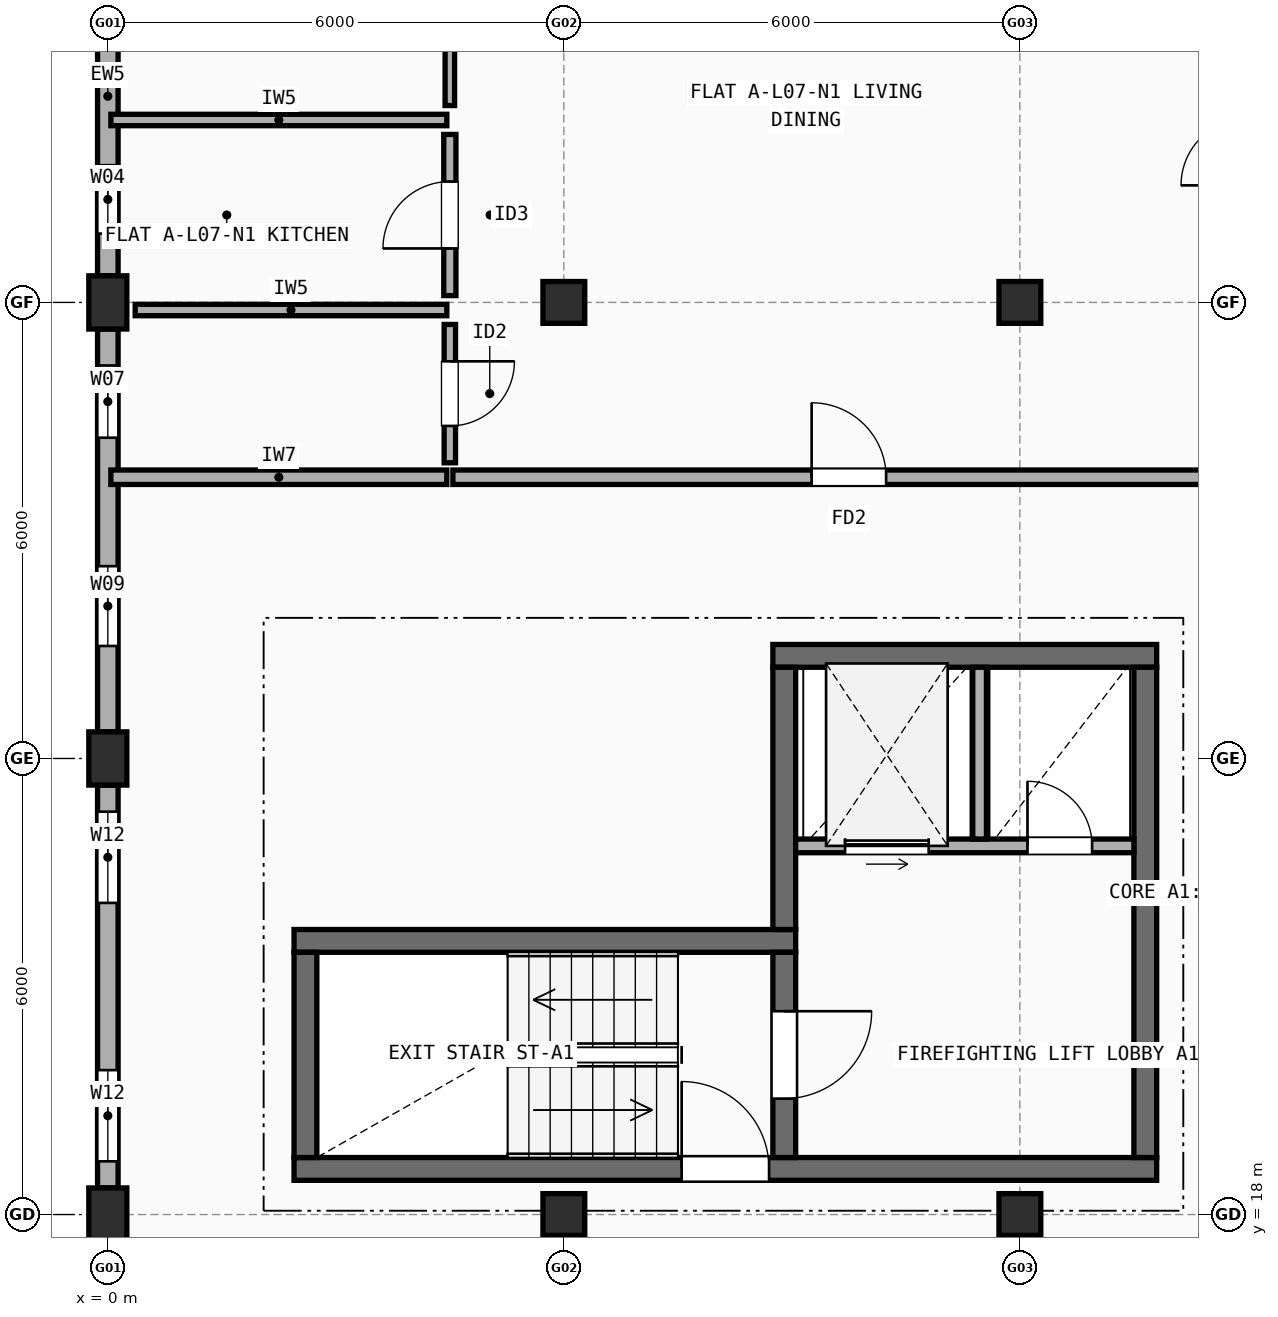
"""IFC4 building model, lengths in metres.
Left out: names, types, materials, properties, quantities, classifications, styles, units other than length and angle.
Written with IfcOpenShell. Run it as: python <this file> out.ifc"""

import sys

from ifc_helpers import new_model, si_unit, direction, frame, frame_2d, origin, origin_2d, place, context, subcontext, project, spatial, rectangle, extrude, element, fill, save


model = new_model("IFC4")
c1 = context("Model", 3, precision=1e-05, world=origin(), true_north=direction((0.0, 1.0)))
c2 = subcontext(c1, "Body", "Model", "MODEL_VIEW")
j1 = project(units=[si_unit("LENGTHUNIT", "METRE"), si_unit("PLANEANGLEUNIT", "RADIAN")], contexts=[c1])
p1 = place(None, origin())
s1 = spatial("IfcSite", under=j1, at=p1, CompositionType="ELEMENT")
p2 = place(p1, origin())
s2 = spatial("IfcBuilding", under=s1, at=p2, CompositionType="ELEMENT")
p3 = place(p2, frame((0.0, 0.0, 23.7)))
s3 = spatial("IfcBuildingStorey", under=s2, at=p3, CompositionType="ELEMENT", Elevation=23.7)
for number, where, z_axis, x_axis in (
    (1, (0.0, 18.0, 0.0), (0.0, 0.0, 1.0), (1.0, 0.0, 0.0)),
    (2, (0.0, 24.0, 0.0), (0.0, 0.0, 1.0), (1.0, 0.0, 0.0)),
    (3, (0.0, 30.0, 0.0), (0.0, 0.0, 1.0), (1.0, 0.0, 0.0)),
):
    element("IfcColumn", number, at=place(p3, frame(where, z_axis=z_axis, x_axis=x_axis)), inside=s3, PredefinedType="COLUMN", context=c2, shape_type="SweptSolid", body=[
        extrude(rectangle(XDim=0.5, YDim=0.7, at=origin_2d()), origin(), (0.0, 0.0, 1.0), 2.975),
    ])
for number, where, z_axis, x_axis in (
    (4, (6.0, 18.0, 0.0), (0.0, 0.0, 1.0), (1.0, 0.0, 0.0)),
    (5, (6.0, 30.0, 0.0), (0.0, 0.0, 1.0), (1.0, 0.0, 0.0)),
    (6, (12.0, 18.0, 0.0), (0.0, 0.0, 1.0), (1.0, 0.0, 0.0)),
    (7, (12.0, 30.0, 0.0), (0.0, 0.0, 1.0), (1.0, 0.0, 0.0)),
):
    element("IfcColumn", number, at=place(p3, frame(where, z_axis=z_axis, x_axis=x_axis)), inside=s3, PredefinedType="COLUMN", context=c2, shape_type="SweptSolid", body=[
        extrude(rectangle(XDim=0.55, YDim=0.55, at=origin_2d()), origin(), (0.0, 0.0, 1.0), 2.975),
    ])
p4 = place(p3, frame((0.0, 35.65, 0.0), z_axis=(0.0, 0.0, 1.0), x_axis=(0.0, -1.0, 0.0)))
e8 = element("IfcWall", 8, at=p4, inside=s3, PredefinedType="STANDARD", context=c2, shape_type="SweptSolid", body=[
    extrude(rectangle(XDim=5.3, YDim=0.27, at=frame_2d((2.65, 0.0))), origin(), (0.0, 0.0, 1.0), 2.457),
])
p5 = place(p4, frame((1.18, 0.0, 0.9)))
e9 = element("IfcOpeningElement", 9, at=p5, cuts=e8, PredefinedType="OPENING", context=c2, shape_type="SweptSolid", body=[
    extrude(rectangle(XDim=0.85, YDim=1.25, at=frame_2d((0.425, 0.625))), frame((0.0, 0.145, 0.0), z_axis=(0.0, -1.0, 0.0), x_axis=(1.0, 0.0, 0.0)), (0.0, 0.0, 1.0), 0.29),
])
p6 = place(p4, frame((3.845, 0.0, 0.9)))
e10 = element("IfcOpeningElement", 10, at=p6, cuts=e8, PredefinedType="OPENING", context=c2, shape_type="SweptSolid", body=[
    extrude(rectangle(XDim=0.9, YDim=1.3, at=frame_2d((0.45, 0.65))), frame((0.0, 0.145, 0.0), z_axis=(0.0, -1.0, 0.0), x_axis=(1.0, 0.0, 0.0)), (0.0, 0.0, 1.0), 0.29),
])
p7 = place(p3, frame((0.0, 29.65, 0.0), z_axis=(0.0, 0.0, 1.0), x_axis=(0.0, -1.0, 0.0)))
e11 = element("IfcWall", 11, at=p7, inside=s3, PredefinedType="STANDARD", context=c2, shape_type="SweptSolid", body=[
    extrude(rectangle(XDim=5.3, YDim=0.27, at=frame_2d((2.65, 0.0))), origin(), (0.0, 0.0, 1.0), 2.457),
])
p8 = place(p7, frame((0.48, 0.0, 0.9)))
e12 = element("IfcOpeningElement", 12, at=p8, cuts=e11, PredefinedType="OPENING", context=c2, shape_type="SweptSolid", body=[
    extrude(rectangle(XDim=0.95, YDim=1.35, at=frame_2d((0.475, 0.675))), frame((0.0, 0.145, 0.0), z_axis=(0.0, -1.0, 0.0), x_axis=(1.0, 0.0, 0.0)), (0.0, 0.0, 1.0), 0.29),
])
p9 = place(p7, frame((3.12, 0.0, 0.9)))
e13 = element("IfcOpeningElement", 13, at=p9, cuts=e11, PredefinedType="OPENING", context=c2, shape_type="SweptSolid", body=[
    extrude(rectangle(XDim=1.05, YDim=1.35, at=frame_2d((0.525, 0.675))), frame((0.0, 0.145, 0.0), z_axis=(0.0, -1.0, 0.0), x_axis=(1.0, 0.0, 0.0)), (0.0, 0.0, 1.0), 0.29),
])
p10 = place(p3, frame((0.0, 23.65, 0.0), z_axis=(0.0, 0.0, 1.0), x_axis=(0.0, -1.0, 0.0)))
e14 = element("IfcWall", 14, at=p10, inside=s3, PredefinedType="STANDARD", context=c2, shape_type="SweptSolid", body=[
    extrude(rectangle(XDim=5.3, YDim=0.27, at=frame_2d((2.65, 0.0))), origin(), (0.0, 0.0, 1.0), 2.457),
])
p11 = place(p10, frame((0.35, 0.0, 0.9)))
e15 = element("IfcOpeningElement", 15, at=p11, cuts=e14, PredefinedType="OPENING", context=c2, shape_type="SweptSolid", body=[
    extrude(rectangle(XDim=1.2, YDim=1.35, at=frame_2d((0.6, 0.675))), frame((0.0, 0.145, 0.0), z_axis=(0.0, -1.0, 0.0), x_axis=(1.0, 0.0, 0.0)), (0.0, 0.0, 1.0), 0.29),
])
p12 = place(p10, frame((3.75, 0.0, 0.9)))
e16 = element("IfcOpeningElement", 16, at=p12, cuts=e14, PredefinedType="OPENING", context=c2, shape_type="SweptSolid", body=[
    extrude(rectangle(XDim=1.2, YDim=1.35, at=frame_2d((0.6, 0.675))), frame((0.0, 0.145, 0.0), z_axis=(0.0, -1.0, 0.0), x_axis=(1.0, 0.0, 0.0)), (0.0, 0.0, 1.0), 0.29),
])
p13 = place(p3, frame((2.45, 18.6, 0.0), z_axis=(0.0, 0.0, 1.0), x_axis=(1.0, 0.0, 0.0)))
e17 = element("IfcWall", 17, at=p13, inside=s3, PredefinedType="SHEAR", context=c2, shape_type="SweptSolid", body=[
    extrude(rectangle(XDim=11.35, YDim=0.3, at=frame_2d((5.675, 0.0))), origin(), (0.0, 0.0, 1.0), 2.975),
])
p14 = place(p13, frame((5.1, 0.0, 0.0)))
e18 = element("IfcOpeningElement", 18, at=p14, cuts=e17, PredefinedType="OPENING", context=c2, shape_type="SweptSolid", body=[
    extrude(rectangle(XDim=1.15, YDim=2.15, at=frame_2d((0.575, 1.075))), frame((0.0, 0.16, 0.0), z_axis=(0.0, -1.0, 0.0), x_axis=(1.0, 0.0, 0.0)), (0.0, 0.0, 1.0), 0.32),
])
p15 = place(p3, frame((9.05, 21.6, 0.0), z_axis=(0.0, 0.0, 1.0), x_axis=(-1.0, 0.0, 0.0)))
e19 = element("IfcWall", 19, at=p15, inside=s3, PredefinedType="SHEAR", context=c2, shape_type="SweptSolid", body=[
    extrude(rectangle(XDim=6.6, YDim=0.3, at=frame_2d((3.3, 0.0))), origin(), (0.0, 0.0, 1.0), 2.975),
])
p16 = place(p3, frame((2.6, 21.45, 0.0), z_axis=(0.0, 0.0, 1.0), x_axis=(0.0, -1.0, 0.0)))
e20 = element("IfcWall", 20, at=p16, inside=s3, PredefinedType="SHEAR", context=c2, shape_type="SweptSolid", body=[
    extrude(rectangle(XDim=2.7, YDim=0.3, at=frame_2d((1.35, 0.0))), origin(), (0.0, 0.0, 1.0), 2.975),
])
p17 = place(p3, frame((8.9, 18.75, 0.0), z_axis=(0.0, 0.0, 1.0), x_axis=(0.0, 1.0, 0.0)))
e21 = element("IfcWall", 21, at=p17, inside=s3, PredefinedType="SHEAR", context=c2, shape_type="SweptSolid", body=[
    extrude(rectangle(XDim=2.7, YDim=0.3, at=frame_2d((1.35, 0.0))), origin(), (0.0, 0.0, 1.0), 2.975),
])
p18 = place(p17, frame((0.775, 0.0, 0.0)))
e22 = element("IfcOpeningElement", 22, at=p18, cuts=e21, PredefinedType="OPENING", context=c2, shape_type="SweptSolid", body=[
    extrude(rectangle(XDim=1.15, YDim=2.15, at=frame_2d((0.575, 1.075))), frame((0.0, 0.16, 0.0), z_axis=(0.0, -1.0, 0.0), x_axis=(1.0, 0.0, 0.0)), (0.0, 0.0, 1.0), 0.32),
])
p19 = place(p3, frame((13.8, 25.35, 0.0), z_axis=(0.0, 0.0, 1.0), x_axis=(-1.0, 0.0, 0.0)))
e23 = element("IfcWall", 23, at=p19, inside=s3, PredefinedType="SHEAR", context=c2, shape_type="SweptSolid", body=[
    extrude(rectangle(XDim=5.05, YDim=0.3, at=frame_2d((2.525, 0.0))), origin(), (0.0, 0.0, 1.0), 2.975),
])
p20 = place(p3, frame((13.65, 18.75, 0.0), z_axis=(0.0, 0.0, 1.0), x_axis=(0.0, 1.0, 0.0)))
e24 = element("IfcWall", 24, at=p20, inside=s3, PredefinedType="SHEAR", context=c2, shape_type="SweptSolid", body=[
    extrude(rectangle(XDim=6.45, YDim=0.3, at=frame_2d((3.225, 0.0))), origin(), (0.0, 0.0, 1.0), 2.975),
])
p21 = place(p3, frame((8.9, 21.75, 0.0), z_axis=(0.0, 0.0, 1.0), x_axis=(0.0, 1.0, 0.0)))
e25 = element("IfcWall", 25, at=p21, inside=s3, PredefinedType="SHEAR", context=c2, shape_type="SweptSolid", body=[
    extrude(rectangle(XDim=3.45, YDim=0.3, at=frame_2d((1.725, 0.0))), origin(), (0.0, 0.0, 1.0), 2.975),
])
p22 = place(p3, frame((9.05, 22.85, 0.0), z_axis=(0.0, 0.0, 1.0), x_axis=(1.0, 0.0, 0.0)))
e26 = element("IfcWall", 26, at=p22, inside=s3, PredefinedType="SOLIDWALL", context=c2, shape_type="SweptSolid", body=[
    extrude(rectangle(XDim=4.45, YDim=0.18, at=frame_2d((2.225, 0.0))), origin(), (0.0, 0.0, 1.0), 2.975),
])
p23 = place(p22, frame((0.65, 0.0, 0.0)))
e27 = element("IfcOpeningElement", 27, at=p23, cuts=e26, PredefinedType="OPENING", context=c2, shape_type="SweptSolid", body=[
    extrude(rectangle(XDim=1.1, YDim=2.15, at=frame_2d((0.55, 1.075))), frame((0.0, 0.1, 0.0), z_axis=(0.0, -1.0, 0.0), x_axis=(1.0, 0.0, 0.0)), (0.0, 0.0, 1.0), 0.2),
])
p24 = place(p22, frame((3.05, 0.0, 0.0)))
e28 = element("IfcOpeningElement", 28, at=p24, cuts=e26, PredefinedType="OPENING", context=c2, shape_type="SweptSolid", body=[
    extrude(rectangle(XDim=0.85, YDim=2.1, at=frame_2d((0.425, 1.05))), frame((0.0, 0.1, 0.0), z_axis=(0.0, -1.0, 0.0), x_axis=(1.0, 0.0, 0.0)), (0.0, 0.0, 1.0), 0.2),
])
p25 = place(p3, frame((11.47, 22.94, 0.0), z_axis=(0.0, 0.0, 1.0), x_axis=(0.0, 1.0, 0.0)))
e29 = element("IfcWall", 29, at=p25, inside=s3, PredefinedType="SOLIDWALL", context=c2, shape_type="SweptSolid", body=[
    extrude(rectangle(XDim=2.26, YDim=0.18, at=frame_2d((1.13, 0.0))), origin(), (0.0, 0.0, 1.0), 2.975),
])
p26 = place(p3, frame((0.04, 27.7, 0.0), z_axis=(0.0, 0.0, 1.0), x_axis=(1.0, 0.0, 0.0)))
e30 = element("IfcWall", 30, at=p26, inside=s3, PredefinedType="SOLIDWALL", context=c2, shape_type="SweptSolid", body=[
    extrude(rectangle(XDim=4.42, YDim=0.19, at=frame_2d((2.21, 0.0))), origin(), (0.0, 0.0, 1.0), 2.457),
])
p27 = place(p3, frame((4.54, 27.7, 0.0), z_axis=(0.0, 0.0, 1.0), x_axis=(1.0, 0.0, 0.0)))
e31 = element("IfcWall", 31, at=p27, inside=s3, PredefinedType="SOLIDWALL", context=c2, shape_type="SweptSolid", body=[
    extrude(rectangle(XDim=10.42, YDim=0.19, at=frame_2d((5.21, 0.0))), origin(), (0.0, 0.0, 1.0), 2.508),
])
p28 = place(p27, frame((4.72, 0.0, 0.0)))
e32 = element("IfcOpeningElement", 32, at=p28, cuts=e31, PredefinedType="OPENING", context=c2, shape_type="SweptSolid", body=[
    extrude(rectangle(XDim=0.98, YDim=2.15, at=frame_2d((0.49, 1.075))), frame((0.0, 0.105, 0.0), z_axis=(0.0, -1.0, 0.0), x_axis=(1.0, 0.0, 0.0)), (0.0, 0.0, 1.0), 0.21),
])
p29 = place(p3, frame((4.5, 32.59, 0.0), z_axis=(0.0, 0.0, 1.0), x_axis=(0.0, 1.0, 0.0)))
e33 = element("IfcWall", 33, at=p29, inside=s3, PredefinedType="PARTITIONING", context=c2, shape_type="SweptSolid", body=[
    extrude(rectangle(XDim=3.22, YDim=0.125, at=frame_2d((1.61, 0.0))), origin(), (0.0, 0.0, 1.0), 2.975),
])
p30 = place(p29, frame((1.16, 0.0, 0.0)))
e34 = element("IfcOpeningElement", 34, at=p30, cuts=e33, PredefinedType="OPENING", context=c2, shape_type="SweptSolid", body=[
    extrude(rectangle(XDim=0.9, YDim=2.1, at=frame_2d((0.45, 1.05))), frame((0.0, 0.073, 0.0), z_axis=(0.0, -1.0, 0.0), x_axis=(1.0, 0.0, 0.0)), (0.0, 0.0, 1.0), 0.145),
])
p31 = place(p3, frame((4.5, 30.09, 0.0), z_axis=(0.0, 0.0, 1.0), x_axis=(0.0, 1.0, 0.0)))
e35 = element("IfcWall", 35, at=p31, inside=s3, PredefinedType="PLUMBINGWALL", context=c2, shape_type="SweptSolid", body=[
    extrude(rectangle(XDim=2.12, YDim=0.16, at=frame_2d((1.06, 0.0))), origin(), (0.0, 0.0, 1.0), 2.457),
])
p32 = place(p31, frame((0.62, 0.0, 0.0)))
e36 = element("IfcOpeningElement", 36, at=p32, cuts=e35, PredefinedType="OPENING", context=c2, shape_type="SweptSolid", body=[
    extrude(rectangle(XDim=0.88, YDim=2.1, at=frame_2d((0.44, 1.05))), frame((0.0, 0.09, 0.0), z_axis=(0.0, -1.0, 0.0), x_axis=(1.0, 0.0, 0.0)), (0.0, 0.0, 1.0), 0.18),
])
p33 = place(p3, frame((4.5, 27.89, 0.0), z_axis=(0.0, 0.0, 1.0), x_axis=(0.0, 1.0, 0.0)))
e37 = element("IfcWall", 37, at=p33, inside=s3, PredefinedType="PARTITIONING", context=c2, shape_type="SweptSolid", body=[
    extrude(rectangle(XDim=1.82, YDim=0.15, at=frame_2d((0.91, 0.0))), origin(), (0.0, 0.0, 1.0), 2.975),
])
p34 = place(p33, frame((0.485, 0.0, 0.0)))
e38 = element("IfcOpeningElement", 38, at=p34, cuts=e37, PredefinedType="OPENING", context=c2, shape_type="SweptSolid", body=[
    extrude(rectangle(XDim=0.85, YDim=2.1, at=frame_2d((0.425, 1.05))), frame((0.0, 0.085, 0.0), z_axis=(0.0, -1.0, 0.0), x_axis=(1.0, 0.0, 0.0)), (0.0, 0.0, 1.0), 0.17),
])
p35 = place(p3, frame((0.04, 32.4, 0.0), z_axis=(0.0, 0.0, 1.0), x_axis=(1.0, 0.0, 0.0)))
e39 = element("IfcWall", 39, at=p35, inside=s3, PredefinedType="PARTITIONING", context=c2, shape_type="SweptSolid", body=[
    extrude(rectangle(XDim=4.42, YDim=0.15, at=frame_2d((2.21, 0.0))), origin(), (0.0, 0.0, 1.0), 2.457),
])
p36 = place(p3, frame((0.36, 29.9, 0.0), z_axis=(0.0, 0.0, 1.0), x_axis=(1.0, 0.0, 0.0)))
e40 = element("IfcWall", 40, at=p36, inside=s3, PredefinedType="PARTITIONING", context=c2, shape_type="SweptSolid", body=[
    extrude(rectangle(XDim=4.1, YDim=0.15, at=frame_2d((2.05, 0.0))), origin(), (0.0, 0.0, 1.0), 2.457),
])
p37 = place(p6, origin())
e41 = element("IfcWindow", 41, at=p37, inside=s3, PartitioningType="SINGLE_PANEL", PredefinedType="WINDOW", context=c2, shape_type="SweptSolid", body=[
    extrude(rectangle(XDim=0.9, YDim=1.3, at=frame_2d((0.45, 0.65))), frame((0.0, 0.03, 0.0), z_axis=(0.0, -1.0, 0.0), x_axis=(1.0, 0.0, 0.0)), (0.0, 0.0, 1.0), 0.06),
])
fill(e10, e41)
p38 = place(p8, origin())
e42 = element("IfcWindow", 42, at=p38, inside=s3, PartitioningType="SINGLE_PANEL", PredefinedType="WINDOW", context=c2, shape_type="SweptSolid", body=[
    extrude(rectangle(XDim=0.95, YDim=1.35, at=frame_2d((0.475, 0.675))), frame((0.0, 0.03, 0.0), z_axis=(0.0, -1.0, 0.0), x_axis=(1.0, 0.0, 0.0)), (0.0, 0.0, 1.0), 0.06),
])
fill(e12, e42)
p39 = place(p9, origin())
e43 = element("IfcWindow", 43, at=p39, inside=s3, PartitioningType="SINGLE_PANEL", PredefinedType="WINDOW", context=c2, shape_type="SweptSolid", body=[
    extrude(rectangle(XDim=1.05, YDim=1.35, at=frame_2d((0.525, 0.675))), frame((0.0, 0.03, 0.0), z_axis=(0.0, -1.0, 0.0), x_axis=(1.0, 0.0, 0.0)), (0.0, 0.0, 1.0), 0.06),
])
fill(e13, e43)
p40 = place(p11, origin())
e44 = element("IfcWindow", 44, at=p40, inside=s3, PartitioningType="SINGLE_PANEL", PredefinedType="WINDOW", context=c2, shape_type="SweptSolid", body=[
    extrude(rectangle(XDim=1.2, YDim=1.35, at=frame_2d((0.6, 0.675))), frame((0.0, 0.03, 0.0), z_axis=(0.0, -1.0, 0.0), x_axis=(1.0, 0.0, 0.0)), (0.0, 0.0, 1.0), 0.06),
])
fill(e15, e44)
p41 = place(p12, origin())
e45 = element("IfcWindow", 45, at=p41, inside=s3, PartitioningType="SINGLE_PANEL", PredefinedType="WINDOW", context=c2, shape_type="SweptSolid", body=[
    extrude(rectangle(XDim=1.2, YDim=1.35, at=frame_2d((0.6, 0.675))), frame((0.0, 0.03, 0.0), z_axis=(0.0, -1.0, 0.0), x_axis=(1.0, 0.0, 0.0)), (0.0, 0.0, 1.0), 0.06),
])
fill(e16, e45)
p42 = place(p14, origin())
e46 = element("IfcDoor", 46, at=p42, inside=s3, OperationType="SINGLE_SWING_LEFT", PredefinedType="DOOR", context=c2, shape_type="SweptSolid", body=[
    extrude(rectangle(XDim=1.15, YDim=2.15, at=frame_2d((0.575, 1.075))), frame((0.0, 0.025, 0.0), z_axis=(0.0, -1.0, 0.0), x_axis=(1.0, 0.0, 0.0)), (0.0, 0.0, 1.0), 0.05),
])
fill(e18, e46)
p43 = place(p18, origin())
e47 = element("IfcDoor", 47, at=p43, inside=s3, OperationType="SINGLE_SWING_RIGHT", PredefinedType="DOOR", context=c2, shape_type="SweptSolid", body=[
    extrude(rectangle(XDim=1.15, YDim=2.15, at=frame_2d((0.575, 1.075))), frame((0.0, 0.025, 0.0), z_axis=(0.0, -1.0, 0.0), x_axis=(1.0, 0.0, 0.0)), (0.0, 0.0, 1.0), 0.05),
])
fill(e22, e47)
p44 = place(p23, origin())
e48 = element("IfcDoor", 48, at=p44, inside=s3, OperationType="SLIDING_TO_LEFT", PredefinedType="DOOR", context=c2, shape_type="SweptSolid", body=[
    extrude(rectangle(XDim=1.1, YDim=2.15, at=frame_2d((0.55, 1.075))), frame((0.0, 0.025, 0.0), z_axis=(0.0, -1.0, 0.0), x_axis=(1.0, 0.0, 0.0)), (0.0, 0.0, 1.0), 0.05),
])
fill(e27, e48)
p45 = place(p24, frame((0.85, 0.0, 0.0), z_axis=(0.0, 0.0, 1.0), x_axis=(-1.0, 0.0, 0.0)))
e49 = element("IfcDoor", 49, at=p45, inside=s3, OperationType="SINGLE_SWING_LEFT", PredefinedType="DOOR", context=c2, shape_type="SweptSolid", body=[
    extrude(rectangle(XDim=0.85, YDim=2.1, at=frame_2d((0.425, 1.05))), frame((0.0, 0.025, 0.0), z_axis=(0.0, -1.0, 0.0), x_axis=(1.0, 0.0, 0.0)), (0.0, 0.0, 1.0), 0.05),
])
fill(e28, e49)
p46 = place(p28, origin())
e50 = element("IfcDoor", 50, at=p46, inside=s3, OperationType="SINGLE_SWING_LEFT", PredefinedType="DOOR", context=c2, shape_type="SweptSolid", body=[
    extrude(rectangle(XDim=0.98, YDim=2.15, at=frame_2d((0.49, 1.075))), frame((0.0, 0.025, 0.0), z_axis=(0.0, -1.0, 0.0), x_axis=(1.0, 0.0, 0.0)), (0.0, 0.0, 1.0), 0.05),
])
fill(e32, e50)
p47 = place(p32, origin())
e51 = element("IfcDoor", 51, at=p47, inside=s3, OperationType="SINGLE_SWING_LEFT", PredefinedType="DOOR", context=c2, shape_type="SweptSolid", body=[
    extrude(rectangle(XDim=0.88, YDim=2.1, at=frame_2d((0.44, 1.05))), frame((0.0, 0.025, 0.0), z_axis=(0.0, -1.0, 0.0), x_axis=(1.0, 0.0, 0.0)), (0.0, 0.0, 1.0), 0.05),
])
fill(e36, e51)
p48 = place(p34, origin())
e52 = element("IfcDoor", 52, at=p48, inside=s3, OperationType="SINGLE_SWING_RIGHT", PredefinedType="DOOR", context=c2, shape_type="SweptSolid", body=[
    extrude(rectangle(XDim=0.85, YDim=2.1, at=frame_2d((0.425, 1.05))), frame((0.0, 0.025, 0.0), z_axis=(0.0, -1.0, 0.0), x_axis=(1.0, 0.0, 0.0)), (0.0, 0.0, 1.0), 0.05),
])
fill(e38, e52)
save(model, sys.argv[1])
